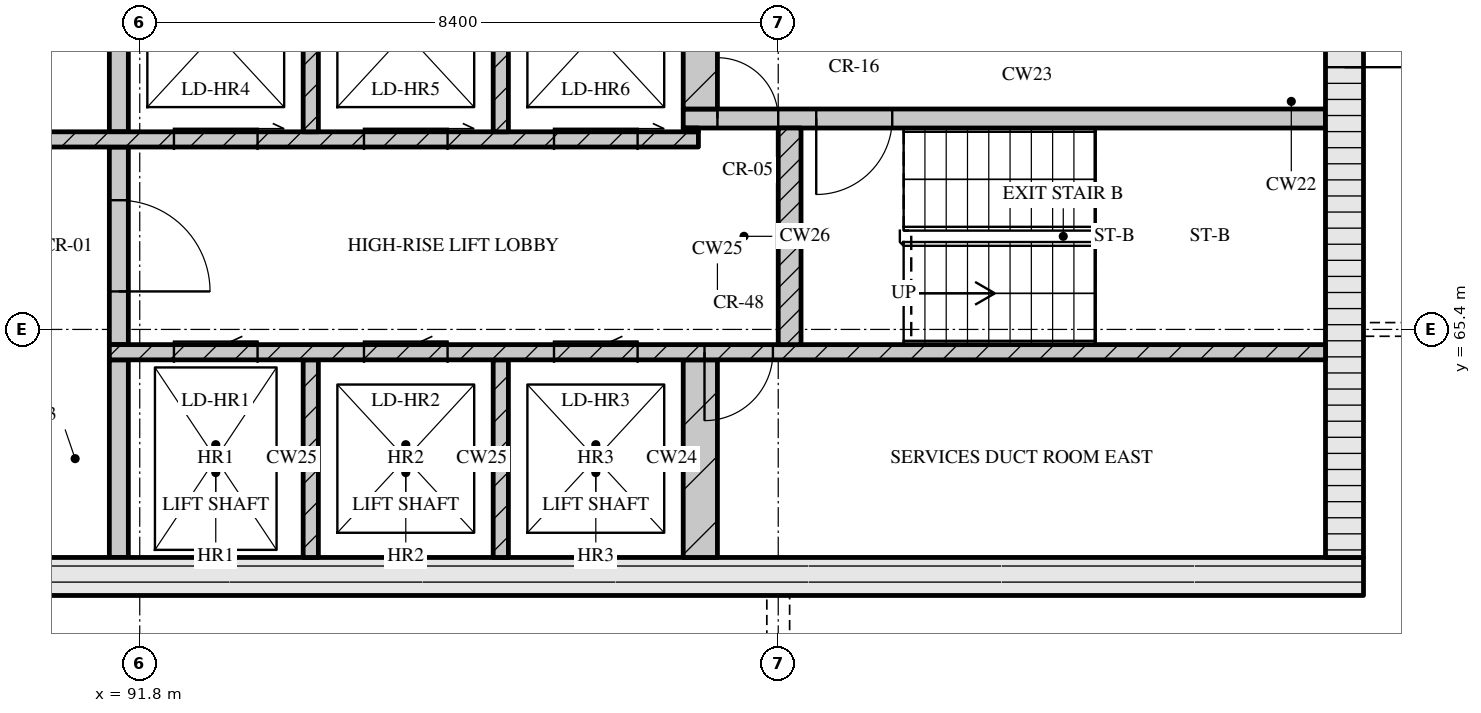
"""IFC4 building model, lengths in metres.
Left out: names, types, materials, properties, quantities, classifications, styles, units other than length and angle.
Written with IfcOpenShell. Run it as: python <this file> out.ifc"""

import sys

from ifc_helpers import new_model, si_unit, direction, frame, frame_2d, origin, place, context, subcontext, project, spatial, rectangle, extrude, element, fill, save


model = new_model("IFC4")
c1 = context("Model", 3, precision=1e-05, world=origin(), true_north=direction((0.0, 1.0)))
c2 = subcontext(c1, "Body", "Model", "MODEL_VIEW")
j1 = project(units=[si_unit("LENGTHUNIT", "METRE"), si_unit("PLANEANGLEUNIT", "RADIAN")], contexts=[c1])
p1 = place(None, origin())
s1 = spatial("IfcSite", under=j1, at=p1, CompositionType="ELEMENT")
p2 = place(p1, origin())
s2 = spatial("IfcBuilding", under=s1, at=p2, CompositionType="ELEMENT")
p3 = place(p2, frame((0.0, 0.0, 267.15)))
s3 = spatial("IfcBuildingStorey", under=s2, at=p3, CompositionType="ELEMENT", Elevation=267.15)
p4 = place(p3, frame((67.3, 62.15, 0.0), z_axis=(0.0, 0.0, 1.0), x_axis=(1.0, 0.0, 0.0)))
e1 = element("IfcWall", 1, at=p4, inside=s3, PredefinedType="SOLIDWALL", context=c2, shape_type="SweptSolid", body=[
    extrude(rectangle(XDim=40.6, YDim=0.5, at=frame_2d((20.3, 0.0))), origin(), (0.0, 0.0, 1.0), 3.32),
])
p5 = place(p4, frame((20.65, 0.0, 0.0)))
e2 = element("IfcOpeningElement", 2, at=p5, cuts=e1, PredefinedType="OPENING", context=c2, shape_type="SweptSolid", body=[
    extrude(rectangle(XDim=1.8, YDim=2.1, at=frame_2d((0.9, 1.05))), frame((0.0, 0.26, 0.0), z_axis=(0.0, -1.0, 0.0), x_axis=(1.0, 0.0, 0.0)), (0.0, 0.0, 1.0), 0.52),
])
p6 = place(p3, frame((107.65, 62.4, 0.0), z_axis=(0.0, 0.0, 1.0), x_axis=(0.0, 1.0, 0.0)))
e3 = element("IfcWall", 3, at=p6, inside=s3, PredefinedType="SOLIDWALL", context=c2, shape_type="SweptSolid", body=[
    extrude(rectangle(XDim=12.0, YDim=0.5, at=frame_2d((6.0, 0.0))), origin(), (0.0, 0.0, 1.0), 3.32),
])
p7 = place(p6, frame((6.45, 0.0, 0.0)))
e4 = element("IfcOpeningElement", 4, at=p7, cuts=e3, PredefinedType="OPENING", context=c2, shape_type="SweptSolid", body=[
    extrude(rectangle(XDim=1.2, YDim=2.1, at=frame_2d((0.6, 1.05))), frame((0.0, 0.26, 0.0), z_axis=(0.0, -1.0, 0.0), x_axis=(1.0, 0.0, 0.0)), (0.0, 0.0, 1.0), 0.52),
])
p8 = place(p3, frame((91.525, 62.4, 0.0), z_axis=(0.0, 0.0, 1.0), x_axis=(0.0, 1.0, 0.0)))
e5 = element("IfcWall", 5, at=p8, inside=s3, PredefinedType="SOLIDWALL", context=c2, shape_type="SweptSolid", body=[
    extrude(rectangle(XDim=2.6, YDim=0.25, at=frame_2d((1.3, 0.0))), origin(), (0.0, 0.0, 1.0), 3.32),
])
for number, where, z_axis, x_axis in (
    (6, (94.05, 62.4, 0.0), (0.0, 0.0, 1.0), (0.0, 1.0, 0.0)),
    (7, (96.55, 62.4, 0.0), (0.0, 0.0, 1.0), (0.0, 1.0, 0.0)),
):
    element("IfcWall", number, at=place(p3, frame(where, z_axis=z_axis, x_axis=x_axis)), inside=s3, PredefinedType="SOLIDWALL", context=c2, shape_type="SweptSolid", body=[
        extrude(rectangle(XDim=2.6, YDim=0.2, at=frame_2d((1.3, 0.0))), origin(), (0.0, 0.0, 1.0), 3.32),
    ])
p9 = place(p3, frame((99.175, 62.4, 0.0), z_axis=(0.0, 0.0, 1.0), x_axis=(0.0, 1.0, 0.0)))
e8 = element("IfcWall", 8, at=p9, inside=s3, PredefinedType="SOLIDWALL", context=c2, shape_type="SweptSolid", body=[
    extrude(rectangle(XDim=2.6, YDim=0.45, at=frame_2d((1.3, 0.0))), origin(), (0.0, 0.0, 1.0), 3.32),
])
p10 = place(p3, frame((91.4, 65.1, 0.0), z_axis=(0.0, 0.0, 1.0), x_axis=(1.0, 0.0, 0.0)))
e9 = element("IfcWall", 9, at=p10, inside=s3, PredefinedType="SOLIDWALL", context=c2, shape_type="SweptSolid", body=[
    extrude(rectangle(XDim=16.0, YDim=0.2, at=frame_2d((8.0, 0.0))), origin(), (0.0, 0.0, 1.0), 3.32),
])
p11 = place(p10, frame((0.85, 0.0, 0.0)))
e10 = element("IfcOpeningElement", 10, at=p11, cuts=e9, PredefinedType="OPENING", context=c2, shape_type="SweptSolid", body=[
    extrude(rectangle(XDim=1.1, YDim=2.1, at=frame_2d((0.55, 1.05))), frame((0.0, 0.11, 0.0), z_axis=(0.0, -1.0, 0.0), x_axis=(1.0, 0.0, 0.0)), (0.0, 0.0, 1.0), 0.22),
])
p12 = place(p10, frame((3.35, 0.0, 0.0)))
e11 = element("IfcOpeningElement", 11, at=p12, cuts=e9, PredefinedType="OPENING", context=c2, shape_type="SweptSolid", body=[
    extrude(rectangle(XDim=1.1, YDim=2.1, at=frame_2d((0.55, 1.05))), frame((0.0, 0.11, 0.0), z_axis=(0.0, -1.0, 0.0), x_axis=(1.0, 0.0, 0.0)), (0.0, 0.0, 1.0), 0.22),
])
p13 = place(p10, frame((5.85, 0.0, 0.0)))
e12 = element("IfcOpeningElement", 12, at=p13, cuts=e9, PredefinedType="OPENING", context=c2, shape_type="SweptSolid", body=[
    extrude(rectangle(XDim=1.1, YDim=2.1, at=frame_2d((0.55, 1.05))), frame((0.0, 0.11, 0.0), z_axis=(0.0, -1.0, 0.0), x_axis=(1.0, 0.0, 0.0)), (0.0, 0.0, 1.0), 0.22),
])
p14 = place(p10, frame((7.83, 0.0, 0.0)))
e13 = element("IfcOpeningElement", 13, at=p14, cuts=e9, PredefinedType="OPENING", context=c2, shape_type="SweptSolid", body=[
    extrude(rectangle(XDim=0.9, YDim=2.1, at=frame_2d((0.45, 1.05))), frame((0.0, 0.11, 0.0), z_axis=(0.0, -1.0, 0.0), x_axis=(1.0, 0.0, 0.0)), (0.0, 0.0, 1.0), 0.22),
])
p15 = place(p3, frame((91.525, 65.2, 0.0), z_axis=(0.0, 0.0, 1.0), x_axis=(0.0, 1.0, 0.0)))
e14 = element("IfcWall", 14, at=p15, inside=s3, PredefinedType="SOLIDWALL", context=c2, shape_type="SweptSolid", body=[
    extrude(rectangle(XDim=2.6, YDim=0.25, at=frame_2d((1.3, 0.0))), origin(), (0.0, 0.0, 1.0), 3.32),
])
p16 = place(p15, frame((0.7, 0.0, 0.0)))
e15 = element("IfcOpeningElement", 15, at=p16, cuts=e14, PredefinedType="OPENING", context=c2, shape_type="SweptSolid", body=[
    extrude(rectangle(XDim=1.2, YDim=2.1, at=frame_2d((0.6, 1.05))), frame((0.0, 0.135, 0.0), z_axis=(0.0, -1.0, 0.0), x_axis=(1.0, 0.0, 0.0)), (0.0, 0.0, 1.0), 0.27),
])
p17 = place(p3, frame((100.35, 65.2, 0.0), z_axis=(0.0, 0.0, 1.0), x_axis=(0.0, 1.0, 0.0)))
e16 = element("IfcWall", 16, at=p17, inside=s3, PredefinedType="SOLIDWALL", context=c2, shape_type="SweptSolid", body=[
    extrude(rectangle(XDim=2.85, YDim=0.3, at=frame_2d((1.425, 0.0))), origin(), (0.0, 0.0, 1.0), 3.32),
])
p18 = place(p3, frame((76.05, 67.9, 0.0), z_axis=(0.0, 0.0, 1.0), x_axis=(1.0, 0.0, 0.0)))
e17 = element("IfcWall", 17, at=p18, inside=s3, PredefinedType="SOLIDWALL", context=c2, shape_type="SweptSolid", body=[
    extrude(rectangle(XDim=23.1, YDim=0.2, at=frame_2d((11.55, 0.0))), origin(), (0.0, 0.0, 1.0), 3.32),
])
p19 = place(p18, frame((1.4, 0.0, 0.0)))
e18 = element("IfcOpeningElement", 18, at=p19, cuts=e17, PredefinedType="OPENING", context=c2, shape_type="SweptSolid", body=[
    extrude(rectangle(XDim=0.9, YDim=2.1, at=frame_2d((0.45, 1.05))), frame((0.0, 0.11, 0.0), z_axis=(0.0, -1.0, 0.0), x_axis=(1.0, 0.0, 0.0)), (0.0, 0.0, 1.0), 0.22),
])
p20 = place(p18, frame((5.11, 0.0, 0.0)))
e19 = element("IfcOpeningElement", 19, at=p20, cuts=e17, PredefinedType="OPENING", context=c2, shape_type="SweptSolid", body=[
    extrude(rectangle(XDim=0.9, YDim=2.1, at=frame_2d((0.45, 1.05))), frame((0.0, 0.11, 0.0), z_axis=(0.0, -1.0, 0.0), x_axis=(1.0, 0.0, 0.0)), (0.0, 0.0, 1.0), 0.22),
])
p21 = place(p18, frame((8.45, 0.0, 0.0)))
e20 = element("IfcOpeningElement", 20, at=p21, cuts=e17, PredefinedType="OPENING", context=c2, shape_type="SweptSolid", body=[
    extrude(rectangle(XDim=0.9, YDim=2.1, at=frame_2d((0.45, 1.05))), frame((0.0, 0.11, 0.0), z_axis=(0.0, -1.0, 0.0), x_axis=(1.0, 0.0, 0.0)), (0.0, 0.0, 1.0), 0.22),
])
p22 = place(p18, frame((10.91, 0.0, 0.0)))
e21 = element("IfcOpeningElement", 21, at=p22, cuts=e17, PredefinedType="OPENING", context=c2, shape_type="SweptSolid", body=[
    extrude(rectangle(XDim=0.9, YDim=2.1, at=frame_2d((0.45, 1.05))), frame((0.0, 0.11, 0.0), z_axis=(0.0, -1.0, 0.0), x_axis=(1.0, 0.0, 0.0)), (0.0, 0.0, 1.0), 0.22),
])
p23 = place(p18, frame((13.55, 0.0, 0.0)))
e22 = element("IfcOpeningElement", 22, at=p23, cuts=e17, PredefinedType="OPENING", context=c2, shape_type="SweptSolid", body=[
    extrude(rectangle(XDim=1.0, YDim=2.1, at=frame_2d((0.5, 1.05))), frame((0.0, 0.11, 0.0), z_axis=(0.0, -1.0, 0.0), x_axis=(1.0, 0.0, 0.0)), (0.0, 0.0, 1.0), 0.22),
])
p24 = place(p18, frame((16.2, 0.0, 0.0)))
e23 = element("IfcOpeningElement", 23, at=p24, cuts=e17, PredefinedType="OPENING", context=c2, shape_type="SweptSolid", body=[
    extrude(rectangle(XDim=1.1, YDim=2.1, at=frame_2d((0.55, 1.05))), frame((0.0, 0.11, 0.0), z_axis=(0.0, -1.0, 0.0), x_axis=(1.0, 0.0, 0.0)), (0.0, 0.0, 1.0), 0.22),
])
p25 = place(p18, frame((18.7, 0.0, 0.0)))
e24 = element("IfcOpeningElement", 24, at=p25, cuts=e17, PredefinedType="OPENING", context=c2, shape_type="SweptSolid", body=[
    extrude(rectangle(XDim=1.1, YDim=2.1, at=frame_2d((0.55, 1.05))), frame((0.0, 0.11, 0.0), z_axis=(0.0, -1.0, 0.0), x_axis=(1.0, 0.0, 0.0)), (0.0, 0.0, 1.0), 0.22),
])
p26 = place(p18, frame((21.2, 0.0, 0.0)))
e25 = element("IfcOpeningElement", 25, at=p26, cuts=e17, PredefinedType="OPENING", context=c2, shape_type="SweptSolid", body=[
    extrude(rectangle(XDim=1.1, YDim=2.1, at=frame_2d((0.55, 1.05))), frame((0.0, 0.11, 0.0), z_axis=(0.0, -1.0, 0.0), x_axis=(1.0, 0.0, 0.0)), (0.0, 0.0, 1.0), 0.22),
])
p27 = place(p3, frame((91.525, 68.0, 0.0), z_axis=(0.0, 0.0, 1.0), x_axis=(0.0, 1.0, 0.0)))
e26 = element("IfcWall", 26, at=p27, inside=s3, PredefinedType="SOLIDWALL", context=c2, shape_type="SweptSolid", body=[
    extrude(rectangle(XDim=2.6, YDim=0.25, at=frame_2d((1.3, 0.0))), origin(), (0.0, 0.0, 1.0), 3.32),
])
for number, where, z_axis, x_axis in (
    (27, (94.05, 68.0, 0.0), (0.0, 0.0, 1.0), (0.0, 1.0, 0.0)),
    (28, (96.55, 68.0, 0.0), (0.0, 0.0, 1.0), (0.0, 1.0, 0.0)),
):
    element("IfcWall", number, at=place(p3, frame(where, z_axis=z_axis, x_axis=x_axis)), inside=s3, PredefinedType="SOLIDWALL", context=c2, shape_type="SweptSolid", body=[
        extrude(rectangle(XDim=2.6, YDim=0.2, at=frame_2d((1.3, 0.0))), origin(), (0.0, 0.0, 1.0), 3.32),
    ])
p28 = place(p3, frame((98.95, 68.025, 0.0), z_axis=(0.0, 0.0, 1.0), x_axis=(1.0, 0.0, 0.0)))
e29 = element("IfcWall", 29, at=p28, inside=s3, PredefinedType="SOLIDWALL", context=c2, shape_type="SweptSolid", body=[
    extrude(rectangle(XDim=0.2, YDim=0.05, at=frame_2d((0.1, 0.0))), origin(), (0.0, 0.0, 1.0), 3.32),
])
p29 = place(p3, frame((98.95, 68.175, 0.0), z_axis=(0.0, 0.0, 1.0), x_axis=(1.0, 0.0, 0.0)))
e30 = element("IfcWall", 30, at=p29, inside=s3, PredefinedType="SOLIDWALL", context=c2, shape_type="SweptSolid", body=[
    extrude(rectangle(XDim=8.45, YDim=0.25, at=frame_2d((4.225, 0.0))), origin(), (0.0, 0.0, 1.0), 3.32),
])
p30 = place(p29, frame((0.45, 0.0, 0.0)))
e31 = element("IfcOpeningElement", 31, at=p30, cuts=e30, PredefinedType="OPENING", context=c2, shape_type="SweptSolid", body=[
    extrude(rectangle(XDim=0.8, YDim=2.1, at=frame_2d((0.4, 1.05))), frame((0.0, 0.135, 0.0), z_axis=(0.0, -1.0, 0.0), x_axis=(1.0, 0.0, 0.0)), (0.0, 0.0, 1.0), 0.27),
])
p31 = place(p29, frame((1.75, 0.0, 0.0)))
e32 = element("IfcOpeningElement", 32, at=p31, cuts=e30, PredefinedType="OPENING", context=c2, shape_type="SweptSolid", body=[
    extrude(rectangle(XDim=1.0, YDim=2.1, at=frame_2d((0.5, 1.05))), frame((0.0, 0.135, 0.0), z_axis=(0.0, -1.0, 0.0), x_axis=(1.0, 0.0, 0.0)), (0.0, 0.0, 1.0), 0.27),
])
p32 = place(p3, frame((99.175, 68.3, 0.0), z_axis=(0.0, 0.0, 1.0), x_axis=(0.0, 1.0, 0.0)))
e33 = element("IfcWall", 33, at=p32, inside=s3, PredefinedType="SOLIDWALL", context=c2, shape_type="SweptSolid", body=[
    extrude(rectangle(XDim=2.3, YDim=0.45, at=frame_2d((1.15, 0.0))), origin(), (0.0, 0.0, 1.0), 3.32),
])
p33 = place(p11, origin())
e34 = element("IfcDoor", 34, at=p33, inside=s3, OperationType="SLIDING_TO_LEFT", PredefinedType="DOOR", context=c2, shape_type="SweptSolid", body=[
    extrude(rectangle(XDim=1.1, YDim=2.1, at=frame_2d((0.55, 1.05))), frame((0.0, 0.025, 0.0), z_axis=(0.0, -1.0, 0.0), x_axis=(1.0, 0.0, 0.0)), (0.0, 0.0, 1.0), 0.05),
])
fill(e10, e34)
p34 = place(p12, origin())
e35 = element("IfcDoor", 35, at=p34, inside=s3, OperationType="SLIDING_TO_LEFT", PredefinedType="DOOR", context=c2, shape_type="SweptSolid", body=[
    extrude(rectangle(XDim=1.1, YDim=2.1, at=frame_2d((0.55, 1.05))), frame((0.0, 0.025, 0.0), z_axis=(0.0, -1.0, 0.0), x_axis=(1.0, 0.0, 0.0)), (0.0, 0.0, 1.0), 0.05),
])
fill(e11, e35)
p35 = place(p13, origin())
e36 = element("IfcDoor", 36, at=p35, inside=s3, OperationType="SLIDING_TO_LEFT", PredefinedType="DOOR", context=c2, shape_type="SweptSolid", body=[
    extrude(rectangle(XDim=1.1, YDim=2.1, at=frame_2d((0.55, 1.05))), frame((0.0, 0.025, 0.0), z_axis=(0.0, -1.0, 0.0), x_axis=(1.0, 0.0, 0.0)), (0.0, 0.0, 1.0), 0.05),
])
fill(e12, e36)
p36 = place(p14, origin())
e37 = element("IfcDoor", 37, at=p36, inside=s3, OperationType="SINGLE_SWING_RIGHT", PredefinedType="DOOR", context=c2, shape_type="SweptSolid", body=[
    extrude(rectangle(XDim=0.9, YDim=2.1, at=frame_2d((0.45, 1.05))), frame((0.0, 0.025, 0.0), z_axis=(0.0, -1.0, 0.0), x_axis=(1.0, 0.0, 0.0)), (0.0, 0.0, 1.0), 0.05),
])
fill(e13, e37)
p37 = place(p16, origin())
e38 = element("IfcDoor", 38, at=p37, inside=s3, OperationType="SINGLE_SWING_RIGHT", PredefinedType="DOOR", context=c2, shape_type="SweptSolid", body=[
    extrude(rectangle(XDim=1.2, YDim=2.1, at=frame_2d((0.6, 1.05))), frame((0.0, 0.025, 0.0), z_axis=(0.0, -1.0, 0.0), x_axis=(1.0, 0.0, 0.0)), (0.0, 0.0, 1.0), 0.05),
])
fill(e15, e38)
p38 = place(p24, origin())
e39 = element("IfcDoor", 39, at=p38, inside=s3, OperationType="SLIDING_TO_RIGHT", PredefinedType="DOOR", context=c2, shape_type="SweptSolid", body=[
    extrude(rectangle(XDim=1.1, YDim=2.1, at=frame_2d((0.55, 1.05))), frame((0.0, 0.025, 0.0), z_axis=(0.0, -1.0, 0.0), x_axis=(1.0, 0.0, 0.0)), (0.0, 0.0, 1.0), 0.05),
])
fill(e23, e39)
p39 = place(p25, origin())
e40 = element("IfcDoor", 40, at=p39, inside=s3, OperationType="SLIDING_TO_RIGHT", PredefinedType="DOOR", context=c2, shape_type="SweptSolid", body=[
    extrude(rectangle(XDim=1.1, YDim=2.1, at=frame_2d((0.55, 1.05))), frame((0.0, 0.025, 0.0), z_axis=(0.0, -1.0, 0.0), x_axis=(1.0, 0.0, 0.0)), (0.0, 0.0, 1.0), 0.05),
])
fill(e24, e40)
p40 = place(p26, origin())
e41 = element("IfcDoor", 41, at=p40, inside=s3, OperationType="SLIDING_TO_RIGHT", PredefinedType="DOOR", context=c2, shape_type="SweptSolid", body=[
    extrude(rectangle(XDim=1.1, YDim=2.1, at=frame_2d((0.55, 1.05))), frame((0.0, 0.025, 0.0), z_axis=(0.0, -1.0, 0.0), x_axis=(1.0, 0.0, 0.0)), (0.0, 0.0, 1.0), 0.05),
])
fill(e25, e41)
p41 = place(p30, origin())
e42 = element("IfcDoor", 42, at=p41, inside=s3, OperationType="SINGLE_SWING_LEFT", PredefinedType="DOOR", context=c2, shape_type="SweptSolid", body=[
    extrude(rectangle(XDim=0.8, YDim=2.1, at=frame_2d((0.4, 1.05))), frame((0.0, 0.025, 0.0), z_axis=(0.0, -1.0, 0.0), x_axis=(1.0, 0.0, 0.0)), (0.0, 0.0, 1.0), 0.05),
])
fill(e31, e42)
p42 = place(p31, origin())
e43 = element("IfcDoor", 43, at=p42, inside=s3, OperationType="SINGLE_SWING_RIGHT", PredefinedType="DOOR", context=c2, shape_type="SweptSolid", body=[
    extrude(rectangle(XDim=1.0, YDim=2.1, at=frame_2d((0.5, 1.05))), frame((0.0, 0.025, 0.0), z_axis=(0.0, -1.0, 0.0), x_axis=(1.0, 0.0, 0.0)), (0.0, 0.0, 1.0), 0.05),
])
fill(e32, e43)
p43 = place(p7, origin())
e44 = element("IfcDoor", 44, at=p43, inside=s3, OperationType="SINGLE_SWING_RIGHT", PredefinedType="DOOR", context=c2, shape_type="SweptSolid", body=[
    extrude(rectangle(XDim=1.2, YDim=2.1, at=frame_2d((0.6, 1.05))), frame((0.0, 0.025, 0.0), z_axis=(0.0, -1.0, 0.0), x_axis=(1.0, 0.0, 0.0)), (0.0, 0.0, 1.0), 0.05),
])
fill(e4, e44)
save(model, sys.argv[1])
